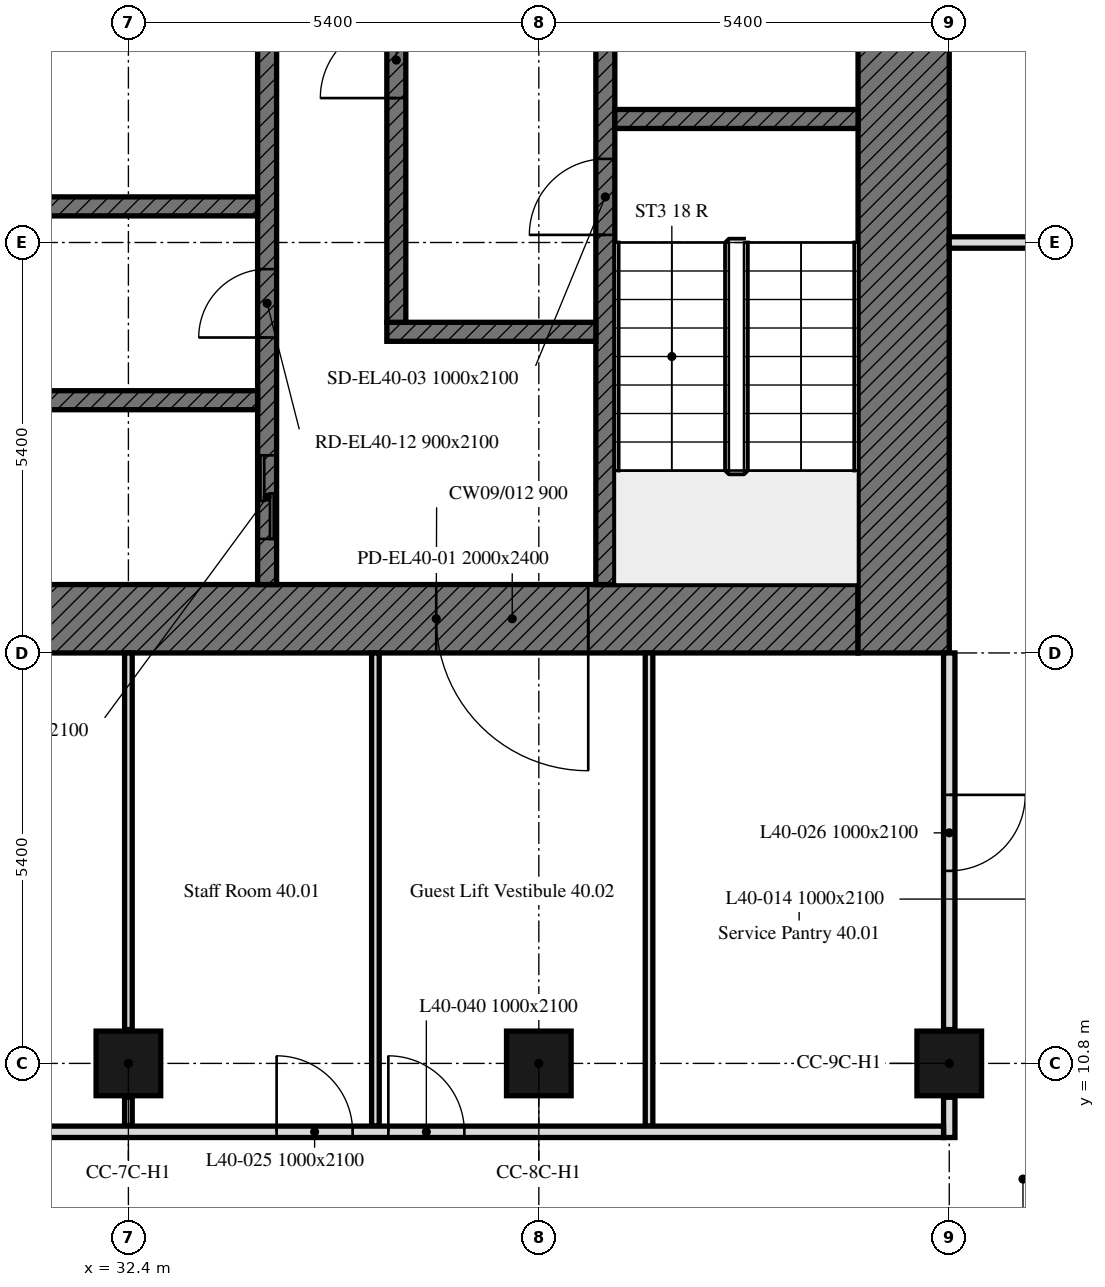
"""IFC4 building model, lengths in metres.
Left out: names, types, materials, properties, quantities, classifications, styles, units other than length and angle.
Written with IfcOpenShell. Run it as: python <this file> out.ifc"""

import sys

from ifc_helpers import new_model, si_unit, direction, frame, frame_2d, origin, origin_2d, place, context, subcontext, project, spatial, rectangle, extrude, element, fill, save


model = new_model("IFC4")
c1 = context("Model", 3, precision=1e-05, world=origin(), true_north=direction((0.0, 1.0)))
c2 = subcontext(c1, "Body", "Model", "MODEL_VIEW")
j1 = project(units=[si_unit("LENGTHUNIT", "METRE"), si_unit("PLANEANGLEUNIT", "RADIAN")], contexts=[c1])
p1 = place(None, origin())
s1 = spatial("IfcSite", under=j1, at=p1, CompositionType="ELEMENT")
p2 = place(p1, origin())
s2 = spatial("IfcBuilding", under=s1, at=p2, CompositionType="ELEMENT")
p3 = place(p2, frame((0.0, 0.0, 169.3)))
s3 = spatial("IfcBuildingStorey", under=s2, at=p3, CompositionType="ELEMENT", Elevation=169.3)
for number, where, z_axis, x_axis in (
    (1, (32.4, 10.8, 0.0), (0.0, 0.0, 1.0), (1.0, 0.0, 0.0)),
    (2, (37.8, 10.8, 0.0), (0.0, 0.0, 1.0), (1.0, 0.0, 0.0)),
    (3, (43.2, 10.8, 0.0), (0.0, 0.0, 1.0), (1.0, 0.0, 0.0)),
):
    element("IfcColumn", number, at=place(p3, frame(where, z_axis=z_axis, x_axis=x_axis)), inside=s3, PredefinedType="COLUMN", context=c2, shape_type="SweptSolid", body=[
        extrude(rectangle(XDim=0.85, YDim=0.85, at=origin_2d()), origin(), (0.0, 0.0, 1.0), 3.0),
    ])
p4 = place(p3, frame((42.0, 16.65, 0.0), z_axis=(0.0, 0.0, 1.0), x_axis=(-1.0, 0.0, 0.0)))
e4 = element("IfcWall", 4, at=p4, inside=s3, PredefinedType="SOLIDWALL", context=c2, shape_type="SweptSolid", body=[
    extrude(rectangle(XDim=11.1, YDim=0.9, at=frame_2d((5.55, 0.0))), origin(), (0.0, 0.0, 1.0), 3.0),
])
p5 = place(p4, frame((3.55, 0.0, 0.0)))
e5 = element("IfcOpeningElement", 5, at=p5, cuts=e4, PredefinedType="OPENING", context=c2, shape_type="SweptSolid", body=[
    extrude(rectangle(XDim=2.0, YDim=2.4, at=frame_2d((1.0, 1.2))), frame((0.0, 0.45, 0.0), z_axis=(0.0, -1.0, 0.0), x_axis=(1.0, 0.0, 0.0)), (0.0, 0.0, 1.0), 0.9),
])
p6 = place(p3, frame((42.6, 32.4, 0.0), z_axis=(0.0, 0.0, 1.0), x_axis=(0.0, -1.0, 0.0)))
e6 = element("IfcWall", 6, at=p6, inside=s3, PredefinedType="SOLIDWALL", context=c2, shape_type="SweptSolid", body=[
    extrude(rectangle(XDim=16.2, YDim=1.2, at=frame_2d((8.1, 0.0))), origin(), (0.0, 0.0, 1.0), 3.0),
])
p7 = place(p3, frame((38.675, 17.1, 0.0), z_axis=(0.0, 0.0, 1.0), x_axis=(0.0, 1.0, 0.0)))
e7 = element("IfcWall", 7, at=p7, inside=s3, PredefinedType="SOLIDWALL", context=c2, shape_type="SweptSolid", body=[
    extrude(rectangle(XDim=14.4, YDim=0.25, at=frame_2d((7.2, 0.0))), origin(), (0.0, 0.0, 1.0), 3.0),
])
p8 = place(p7, frame((4.6, 0.0, 0.0)))
e8 = element("IfcOpeningElement", 8, at=p8, cuts=e7, PredefinedType="OPENING", context=c2, shape_type="SweptSolid", body=[
    extrude(rectangle(XDim=1.0, YDim=2.1, at=frame_2d((0.5, 1.05))), frame((0.0, 0.125, 0.0), z_axis=(0.0, -1.0, 0.0), x_axis=(1.0, 0.0, 0.0)), (0.0, 0.0, 1.0), 0.25),
])
p9 = place(p7, frame((7.062, 0.0, 0.0)))
e9 = element("IfcOpeningElement", 9, at=p9, cuts=e7, PredefinedType="OPENING", context=c2, shape_type="SweptSolid", body=[
    extrude(rectangle(XDim=1.2, YDim=2.1, at=frame_2d((0.6, 1.05))), frame((0.0, 0.125, 0.0), z_axis=(0.0, -1.0, 0.0), x_axis=(1.0, 0.0, 0.0)), (0.0, 0.0, 1.0), 0.25),
])
p10 = place(p7, frame((9.726, 0.0, 0.0)))
e10 = element("IfcOpeningElement", 10, at=p10, cuts=e7, PredefinedType="OPENING", context=c2, shape_type="SweptSolid", body=[
    extrude(rectangle(XDim=0.9, YDim=2.1, at=frame_2d((0.45, 1.05))), frame((0.0, 0.125, 0.0), z_axis=(0.0, -1.0, 0.0), x_axis=(1.0, 0.0, 0.0)), (0.0, 0.0, 1.0), 0.25),
])
p11 = place(p7, frame((11.539, 0.0, 0.0)))
e11 = element("IfcOpeningElement", 11, at=p11, cuts=e7, PredefinedType="OPENING", context=c2, shape_type="SweptSolid", body=[
    extrude(rectangle(XDim=0.9, YDim=2.1, at=frame_2d((0.45, 1.05))), frame((0.0, 0.125, 0.0), z_axis=(0.0, -1.0, 0.0), x_axis=(1.0, 0.0, 0.0)), (0.0, 0.0, 1.0), 0.25),
])
p12 = place(p7, frame((13.226, 0.0, 0.0)))
e12 = element("IfcOpeningElement", 12, at=p12, cuts=e7, PredefinedType="OPENING", context=c2, shape_type="SweptSolid", body=[
    extrude(rectangle(XDim=0.9, YDim=2.1, at=frame_2d((0.45, 1.05))), frame((0.0, 0.125, 0.0), z_axis=(0.0, -1.0, 0.0), x_axis=(1.0, 0.0, 0.0)), (0.0, 0.0, 1.0), 0.25),
])
p13 = place(p3, frame((34.225, 17.1, 0.0), z_axis=(0.0, 0.0, 1.0), x_axis=(0.0, 1.0, 0.0)))
e13 = element("IfcWall", 13, at=p13, inside=s3, PredefinedType="SOLIDWALL", context=c2, shape_type="SweptSolid", body=[
    extrude(rectangle(XDim=14.4, YDim=0.25, at=frame_2d((7.2, 0.0))), origin(), (0.0, 0.0, 1.0), 3.0),
])
p14 = place(p13, frame((13.15, 0.0, 0.0)))
e14 = element("IfcOpeningElement", 14, at=p14, cuts=e13, PredefinedType="OPENING", context=c2, shape_type="SweptSolid", body=[
    extrude(rectangle(XDim=1.0, YDim=2.1, at=frame_2d((0.5, 1.05))), frame((0.0, 0.125, 0.0), z_axis=(0.0, -1.0, 0.0), x_axis=(1.0, 0.0, 0.0)), (0.0, 0.0, 1.0), 0.25),
])
p15 = place(p13, frame((0.6, 0.0, 0.0)))
e15 = element("IfcOpeningElement", 15, at=p15, cuts=e13, PredefinedType="OPENING", context=c2, shape_type="SweptSolid", body=[
    extrude(rectangle(XDim=1.1, YDim=2.1, at=frame_2d((0.55, 1.05))), frame((0.0, 0.125, 0.0), z_axis=(0.0, -1.0, 0.0), x_axis=(1.0, 0.0, 0.0)), (0.0, 0.0, 1.0), 0.25),
])
p16 = place(p13, frame((3.25, 0.0, 0.0)))
e16 = element("IfcOpeningElement", 16, at=p16, cuts=e13, PredefinedType="OPENING", context=c2, shape_type="SweptSolid", body=[
    extrude(rectangle(XDim=0.9, YDim=2.1, at=frame_2d((0.45, 1.05))), frame((0.0, 0.125, 0.0), z_axis=(0.0, -1.0, 0.0), x_axis=(1.0, 0.0, 0.0)), (0.0, 0.0, 1.0), 0.25),
])
p17 = place(p3, frame((38.8, 23.225, 0.0), z_axis=(0.0, 0.0, 1.0), x_axis=(1.0, 0.0, 0.0)))
e17 = element("IfcWall", 17, at=p17, inside=s3, PredefinedType="SOLIDWALL", context=c2, shape_type="SweptSolid", body=[
    extrude(rectangle(XDim=3.2, YDim=0.25, at=frame_2d((1.6, 0.0))), origin(), (0.0, 0.0, 1.0), 3.0),
])
p18 = place(p3, frame((30.9, 22.075, 0.0), z_axis=(0.0, 0.0, 1.0), x_axis=(1.0, 0.0, 0.0)))
e18 = element("IfcWall", 18, at=p18, inside=s3, PredefinedType="SOLIDWALL", context=c2, shape_type="SweptSolid", body=[
    extrude(rectangle(XDim=3.2, YDim=0.25, at=frame_2d((1.6, 0.0))), origin(), (0.0, 0.0, 1.0), 3.0),
])
p19 = place(p3, frame((35.8, 20.425, 0.0), z_axis=(0.0, 0.0, 1.0), x_axis=(1.0, 0.0, 0.0)))
e19 = element("IfcWall", 19, at=p19, inside=s3, PredefinedType="SOLIDWALL", context=c2, shape_type="SweptSolid", body=[
    extrude(rectangle(XDim=2.75, YDim=0.25, at=frame_2d((1.375, 0.0))), origin(), (0.0, 0.0, 1.0), 3.0),
])
p20 = place(p3, frame((35.925, 20.55, 0.0), z_axis=(0.0, 0.0, 1.0), x_axis=(0.0, 1.0, 0.0)))
e20 = element("IfcWall", 20, at=p20, inside=s3, PredefinedType="SOLIDWALL", context=c2, shape_type="SweptSolid", body=[
    extrude(rectangle(XDim=5.625, YDim=0.25, at=frame_2d((2.812, 0.0))), origin(), (0.0, 0.0, 1.0), 3.0),
])
p21 = place(p20, frame((2.95, 0.0, 0.0)))
e21 = element("IfcOpeningElement", 21, at=p21, cuts=e20, PredefinedType="OPENING", context=c2, shape_type="SweptSolid", body=[
    extrude(rectangle(XDim=1.0, YDim=2.1, at=frame_2d((0.5, 1.05))), frame((0.0, 0.125, 0.0), z_axis=(0.0, -1.0, 0.0), x_axis=(1.0, 0.0, 0.0)), (0.0, 0.0, 1.0), 0.25),
])
p22 = place(p3, frame((30.9, 19.525, 0.0), z_axis=(0.0, 0.0, 1.0), x_axis=(1.0, 0.0, 0.0)))
e22 = element("IfcWall", 22, at=p22, inside=s3, PredefinedType="SOLIDWALL", context=c2, shape_type="SweptSolid", body=[
    extrude(rectangle(XDim=3.2, YDim=0.25, at=frame_2d((1.6, 0.0))), origin(), (0.0, 0.0, 1.0), 3.0),
])
p23 = place(p3, frame((43.2, 21.6, 0.0), z_axis=(0.0, 0.0, 1.0), x_axis=(1.0, 0.0, 0.0)))
e23 = element("IfcWall", 23, at=p23, inside=s3, PredefinedType="PARTITIONING", context=c2, shape_type="SweptSolid", body=[
    extrude(rectangle(XDim=4.649, YDim=0.15, at=frame_2d((2.325, 0.0))), origin(), (0.0, 0.0, 1.0), 2.4),
])
p24 = place(p3, frame((32.4, 9.975, 0.0), z_axis=(0.0, 0.0, 1.0), x_axis=(0.0, 1.0, 0.0)))
e24 = element("IfcWall", 24, at=p24, inside=s3, PredefinedType="PARTITIONING", context=c2, shape_type="SweptSolid", body=[
    extrude(rectangle(XDim=0.38, YDim=0.1, at=frame_2d((0.19, 0.0))), origin(), (0.0, 0.0, 1.0), 2.4),
])
p25 = place(p3, frame((32.4, 11.245, 0.0), z_axis=(0.0, 0.0, 1.0), x_axis=(0.0, 1.0, 0.0)))
e25 = element("IfcWall", 25, at=p25, inside=s3, PredefinedType="PARTITIONING", context=c2, shape_type="SweptSolid", body=[
    extrude(rectangle(XDim=4.955, YDim=0.1, at=frame_2d((2.478, 0.0))), origin(), (0.0, 0.0, 1.0), 2.4),
])
for number, where, z_axis, x_axis in (
    (26, (35.65, 16.2, 0.0), (0.0, 0.0, 1.0), (0.0, -1.0, 0.0)),
    (27, (39.25, 9.975, 0.0), (0.0, 0.0, 1.0), (0.0, 1.0, 0.0)),
):
    element("IfcWall", number, at=place(p3, frame(where, z_axis=z_axis, x_axis=x_axis)), inside=s3, PredefinedType="PARTITIONING", context=c2, shape_type="SweptSolid", body=[
        extrude(rectangle(XDim=6.225, YDim=0.1, at=frame_2d((3.112, 0.0))), origin(), (0.0, 0.0, 1.0), 2.4),
    ])
p26 = place(p3, frame((43.2, 16.2, 0.0), z_axis=(0.0, 0.0, 1.0), x_axis=(0.0, -1.0, 0.0)))
e28 = element("IfcWall", 28, at=p26, inside=s3, PredefinedType="PARTITIONING", context=c2, shape_type="SweptSolid", body=[
    extrude(rectangle(XDim=4.955, YDim=0.15, at=frame_2d((2.478, 0.0))), origin(), (0.0, 0.0, 1.0), 3.0),
])
p27 = place(p26, frame((1.867, 0.0, 0.0)))
e29 = element("IfcOpeningElement", 29, at=p27, cuts=e28, PredefinedType="OPENING", context=c2, shape_type="SweptSolid", body=[
    extrude(rectangle(XDim=1.0, YDim=2.1, at=frame_2d((0.5, 1.05))), frame((0.0, 0.075, 0.0), z_axis=(0.0, -1.0, 0.0), x_axis=(1.0, 0.0, 0.0)), (0.0, 0.0, 1.0), 0.15),
])
p28 = place(p3, frame((43.2, 10.355, 0.0), z_axis=(0.0, 0.0, 1.0), x_axis=(0.0, -1.0, 0.0)))
e30 = element("IfcWall", 30, at=p28, inside=s3, PredefinedType="PARTITIONING", context=c2, shape_type="SweptSolid", body=[
    extrude(rectangle(XDim=0.53, YDim=0.15, at=frame_2d((0.265, 0.0))), origin(), (0.0, 0.0, 1.0), 3.0),
])
p29 = place(p3, frame((6.151, 9.9, 0.0), z_axis=(0.0, 0.0, 1.0), x_axis=(1.0, 0.0, 0.0)))
e31 = element("IfcWall", 31, at=p29, inside=s3, PredefinedType="PARTITIONING", context=c2, shape_type="SweptSolid", body=[
    extrude(rectangle(XDim=36.974, YDim=0.15, at=frame_2d((18.487, 0.0))), origin(), (0.0, 0.0, 1.0), 2.4),
])
p30 = place(p29, frame((17.649, 0.0, 0.0)))
e32 = element("IfcOpeningElement", 32, at=p30, cuts=e31, PredefinedType="OPENING", context=c2, shape_type="SweptSolid", body=[
    extrude(rectangle(XDim=1.0, YDim=2.1, at=frame_2d((0.5, 1.05))), frame((0.0, 0.075, 0.0), z_axis=(0.0, -1.0, 0.0), x_axis=(1.0, 0.0, 0.0)), (0.0, 0.0, 1.0), 0.15),
])
p31 = place(p29, frame((1.409, 0.0, 0.0)))
e33 = element("IfcOpeningElement", 33, at=p31, cuts=e31, PredefinedType="OPENING", context=c2, shape_type="SweptSolid", body=[
    extrude(rectangle(XDim=1.0, YDim=2.1, at=frame_2d((0.5, 1.05))), frame((0.0, 0.075, 0.0), z_axis=(0.0, -1.0, 0.0), x_axis=(1.0, 0.0, 0.0)), (0.0, 0.0, 1.0), 0.15),
])
p32 = place(p29, frame((28.199, 0.0, 0.0)))
e34 = element("IfcOpeningElement", 34, at=p32, cuts=e31, PredefinedType="OPENING", context=c2, shape_type="SweptSolid", body=[
    extrude(rectangle(XDim=1.0, YDim=2.1, at=frame_2d((0.5, 1.05))), frame((0.0, 0.075, 0.0), z_axis=(0.0, -1.0, 0.0), x_axis=(1.0, 0.0, 0.0)), (0.0, 0.0, 1.0), 0.15),
])
p33 = place(p29, frame((7.099, 0.0, 0.0)))
e35 = element("IfcOpeningElement", 35, at=p33, cuts=e31, PredefinedType="OPENING", context=c2, shape_type="SweptSolid", body=[
    extrude(rectangle(XDim=1.0, YDim=2.1, at=frame_2d((0.5, 1.05))), frame((0.0, 0.075, 0.0), z_axis=(0.0, -1.0, 0.0), x_axis=(1.0, 0.0, 0.0)), (0.0, 0.0, 1.0), 0.15),
])
p34 = place(p29, frame((5.629, 0.0, 0.0)))
e36 = element("IfcOpeningElement", 36, at=p34, cuts=e31, PredefinedType="OPENING", context=c2, shape_type="SweptSolid", body=[
    extrude(rectangle(XDim=1.0, YDim=2.1, at=frame_2d((0.5, 1.05))), frame((0.0, 0.075, 0.0), z_axis=(0.0, -1.0, 0.0), x_axis=(1.0, 0.0, 0.0)), (0.0, 0.0, 1.0), 0.15),
])
p35 = place(p29, frame((29.669, 0.0, 0.0)))
e37 = element("IfcOpeningElement", 37, at=p35, cuts=e31, PredefinedType="OPENING", context=c2, shape_type="SweptSolid", body=[
    extrude(rectangle(XDim=1.0, YDim=2.1, at=frame_2d((0.5, 1.05))), frame((0.0, 0.075, 0.0), z_axis=(0.0, -1.0, 0.0), x_axis=(1.0, 0.0, 0.0)), (0.0, 0.0, 1.0), 0.15),
])
p36 = place(p5, origin())
e38 = element("IfcDoor", 38, at=p36, inside=s3, OperationType="DOUBLE_DOOR_SINGLE_SWING", PredefinedType="DOOR", context=c2, shape_type="SweptSolid", body=[
    extrude(rectangle(XDim=2.0, YDim=2.4, at=frame_2d((1.0, 1.2))), frame((0.0, 0.025, 0.0), z_axis=(0.0, -1.0, 0.0), x_axis=(1.0, 0.0, 0.0)), (0.0, 0.0, 1.0), 0.05),
])
fill(e5, e38)
p37 = place(p8, origin())
e39 = element("IfcDoor", 39, at=p37, inside=s3, OperationType="SINGLE_SWING_LEFT", PredefinedType="DOOR", context=c2, shape_type="SweptSolid", body=[
    extrude(rectangle(XDim=1.0, YDim=2.1, at=frame_2d((0.5, 1.05))), frame((0.0, 0.025, 0.0), z_axis=(0.0, -1.0, 0.0), x_axis=(1.0, 0.0, 0.0)), (0.0, 0.0, 1.0), 0.05),
])
fill(e8, e39)
p38 = place(p21, origin())
e40 = element("IfcDoor", 40, at=p38, inside=s3, OperationType="SINGLE_SWING_LEFT", PredefinedType="DOOR", context=c2, shape_type="SweptSolid", body=[
    extrude(rectangle(XDim=1.0, YDim=2.1, at=frame_2d((0.5, 1.05))), frame((0.0, 0.025, 0.0), z_axis=(0.0, -1.0, 0.0), x_axis=(1.0, 0.0, 0.0)), (0.0, 0.0, 1.0), 0.05),
])
fill(e21, e40)
p39 = place(p15, origin())
e41 = element("IfcDoor", 41, at=p39, inside=s3, OperationType="DOUBLE_DOOR_SLIDING", PredefinedType="DOOR", context=c2, shape_type="SweptSolid", body=[
    extrude(rectangle(XDim=1.1, YDim=2.1, at=frame_2d((0.55, 1.05))), frame((0.0, 0.025, 0.0), z_axis=(0.0, -1.0, 0.0), x_axis=(1.0, 0.0, 0.0)), (0.0, 0.0, 1.0), 0.05),
])
fill(e15, e41)
p40 = place(p16, origin())
e42 = element("IfcDoor", 42, at=p40, inside=s3, OperationType="SINGLE_SWING_LEFT", PredefinedType="DOOR", context=c2, shape_type="SweptSolid", body=[
    extrude(rectangle(XDim=0.9, YDim=2.1, at=frame_2d((0.45, 1.05))), frame((0.0, 0.025, 0.0), z_axis=(0.0, -1.0, 0.0), x_axis=(1.0, 0.0, 0.0)), (0.0, 0.0, 1.0), 0.05),
])
fill(e16, e42)
p41 = place(p32, origin())
e43 = element("IfcDoor", 43, at=p41, inside=s3, OperationType="SINGLE_SWING_RIGHT", PredefinedType="DOOR", context=c2, shape_type="SweptSolid", body=[
    extrude(rectangle(XDim=1.0, YDim=2.1, at=frame_2d((0.5, 1.05))), frame((0.0, 0.025, 0.0), z_axis=(0.0, -1.0, 0.0), x_axis=(1.0, 0.0, 0.0)), (0.0, 0.0, 1.0), 0.05),
])
fill(e34, e43)
p42 = place(p27, origin())
e44 = element("IfcDoor", 44, at=p42, inside=s3, OperationType="SINGLE_SWING_LEFT", PredefinedType="DOOR", context=c2, shape_type="SweptSolid", body=[
    extrude(rectangle(XDim=1.0, YDim=2.1, at=frame_2d((0.5, 1.05))), frame((0.0, 0.025, 0.0), z_axis=(0.0, -1.0, 0.0), x_axis=(1.0, 0.0, 0.0)), (0.0, 0.0, 1.0), 0.05),
])
fill(e29, e44)
p43 = place(p35, origin())
e45 = element("IfcDoor", 45, at=p43, inside=s3, OperationType="SINGLE_SWING_RIGHT", PredefinedType="DOOR", context=c2, shape_type="SweptSolid", body=[
    extrude(rectangle(XDim=1.0, YDim=2.1, at=frame_2d((0.5, 1.05))), frame((0.0, 0.025, 0.0), z_axis=(0.0, -1.0, 0.0), x_axis=(1.0, 0.0, 0.0)), (0.0, 0.0, 1.0), 0.05),
])
fill(e37, e45)
save(model, sys.argv[1])
